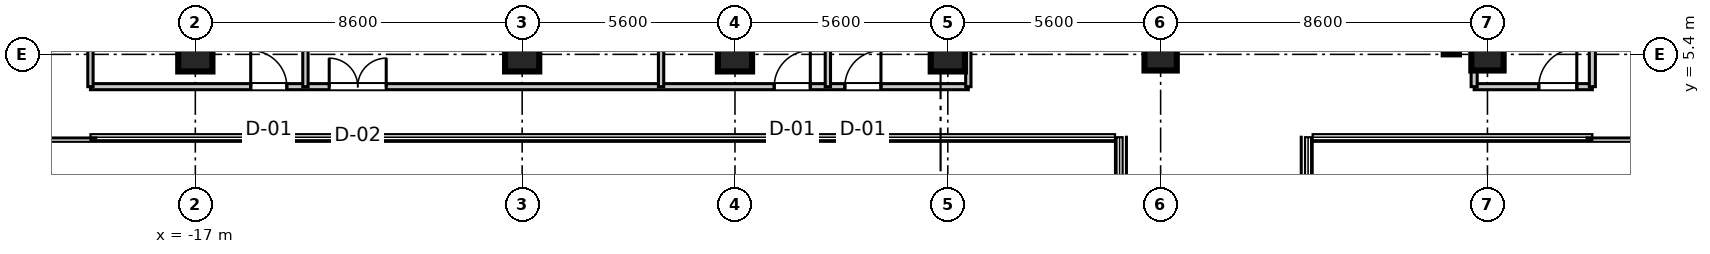
"""IFC4 building model, lengths in metres.
Left out: names, types, materials, properties, quantities, classifications, styles, units other than length and angle.
Written with IfcOpenShell. Run it as: python <this file> out.ifc"""

import sys

from ifc_helpers import new_model, si_unit, direction, frame, frame_2d, origin, origin_2d, place, context, subcontext, project, spatial, rectangle, extrude, source, transform, mapped, element, fill, save


model = new_model("IFC4")
c1 = context("Model", 3, precision=1e-05, world=origin(), true_north=direction((0.0, 1.0)))
c2 = subcontext(c1, "Body", "Model", "MODEL_VIEW")
j1 = project(units=[si_unit("LENGTHUNIT", "METRE"), si_unit("PLANEANGLEUNIT", "RADIAN")], contexts=[c1])
p1 = place(None, origin())
s1 = spatial("IfcSite", under=j1, at=p1, CompositionType="ELEMENT")
p2 = place(p1, origin())
s2 = spatial("IfcBuilding", under=s1, at=p2, CompositionType="ELEMENT")
p3 = place(p2, frame((0.0, 0.0, 304.2)))
s3 = spatial("IfcBuildingStorey", under=s2, at=p3, CompositionType="ELEMENT", Elevation=304.2)
m1 = source(origin(), c2, "Body", "SweptSolid", [
    extrude(rectangle(XDim=0.9, YDim=0.9, at=origin_2d()), origin(), (0.0, 0.0, 1.0), 3.805),
])
for number, where, z_axis, x_axis in (
    (1, (-17.0, 5.4, 0.0), (0.0, 0.0, 1.0), (1.0, 0.0, 0.0)),
    (2, (-8.4, 5.4, 0.0), (0.0, 0.0, 1.0), (1.0, 0.0, 0.0)),
    (3, (-2.8, 5.4, 0.0), (0.0, 0.0, 1.0), (1.0, 0.0, 0.0)),
    (4, (2.8, 5.4, 0.0), (0.0, 0.0, 1.0), (1.0, 0.0, 0.0)),
):
    element("IfcColumn", number, at=place(p3, frame(where, z_axis=z_axis, x_axis=x_axis)), inside=s3, PredefinedType="COLUMN", context=c2, shape_type="MappedRepresentation", body=[
        mapped(m1, transform((0.0, 0.0, 0.0), scale=1.0)),
    ])
m2 = source(origin(), c2, "Body", "SweptSolid", [
    extrude(rectangle(XDim=0.85, YDim=0.85, at=origin_2d()), origin(), (0.0, 0.0, 1.0), 3.805),
])
for number, where, z_axis, x_axis in (
    (5, (8.4, 5.4, 0.0), (0.0, 0.0, 1.0), (1.0, 0.0, 0.0)),
    (6, (17.0, 5.4, 0.0), (0.0, 0.0, 1.0), (1.0, 0.0, 0.0)),
):
    element("IfcColumn", number, at=place(p3, frame(where, z_axis=z_axis, x_axis=x_axis)), inside=s3, PredefinedType="PILASTER", context=c2, shape_type="MappedRepresentation", body=[
        mapped(m2, transform((0.0, 0.0, 0.0), scale=1.0)),
    ])
m3 = source(origin(), c2, "Body", "SweptSolid", [
    extrude(rectangle(XDim=11.6, YDim=0.4, at=frame_2d((5.8, 0.0))), origin(), (0.0, 0.0, 1.0), 3.55),
])
p4 = place(p3, frame((16.05, 5.4, 0.0), z_axis=(0.0, 0.0, 1.0), x_axis=(0.0, 1.0, 0.0)))
e7 = element("IfcWall", 7, at=p4, inside=s3, PredefinedType="SHEAR", context=c2, shape_type="MappedRepresentation", body=[
    mapped(m3, transform((0.0, 0.0, 0.0), scale=1.0)),
])
m4 = source(origin(), c2, "Body", "SweptSolid", [
    extrude(rectangle(XDim=3.11, YDim=0.16, at=frame_2d((1.555, 0.0))), origin(), (0.0, 0.0, 1.0), 2.89),
])
p5 = place(p3, frame((16.65, 4.55, 0.0), z_axis=(0.0, 0.0, 1.0), x_axis=(1.0, 0.0, 0.0)))
e8 = element("IfcWall", 8, at=p5, inside=s3, PredefinedType="PARTITIONING", context=c2, shape_type="MappedRepresentation", body=[
    mapped(m4, transform((0.0, 0.0, 0.0), scale=1.0)),
])
p6 = place(p5, frame((1.701, 0.0, 0.0)))
e9 = element("IfcOpeningElement", 9, at=p6, cuts=e8, PredefinedType="OPENING", context=c2, shape_type="SweptSolid", body=[
    extrude(rectangle(XDim=1.0, YDim=2.1, at=frame_2d((0.5, 1.05))), frame((0.0, 0.09, 0.0), z_axis=(0.0, -1.0, 0.0), x_axis=(1.0, 0.0, 0.0)), (0.0, 0.0, 1.0), 0.18),
])
m5 = source(origin(), c2, "Body", "SweptSolid", [
    extrude(rectangle(XDim=17.95, YDim=0.16, at=frame_2d((8.975, 0.0))), origin(), (0.0, 0.0, 1.0), 2.89),
])
p7 = place(p3, frame((16.65, 4.55, 0.0), z_axis=(0.0, 0.0, 1.0), x_axis=(0.0, 1.0, 0.0)))
e10 = element("IfcWall", 10, at=p7, inside=s3, PredefinedType="PARTITIONING", context=c2, shape_type="MappedRepresentation", body=[
    mapped(m5, transform((0.0, 0.0, 0.0), scale=1.0)),
])
m6 = source(origin(), c2, "Body", "SweptSolid", [
    extrude(rectangle(XDim=16.53, YDim=0.16, at=frame_2d((8.265, 0.0))), origin(), (0.0, 0.0, 1.0), 2.89),
])
p8 = place(p3, frame((19.76, 4.55, 0.0), z_axis=(0.0, 0.0, 1.0), x_axis=(0.0, 1.0, 0.0)))
e11 = element("IfcWall", 11, at=p8, inside=s3, PredefinedType="PARTITIONING", context=c2, shape_type="MappedRepresentation", body=[
    mapped(m6, transform((0.0, 0.0, 0.0), scale=1.0)),
])
m7 = source(origin(), c2, "Body", "SweptSolid", [
    extrude(rectangle(XDim=23.1, YDim=0.16, at=frame_2d((11.55, 0.0))), origin(), (0.0, 0.0, 1.0), 2.89),
])
p9 = place(p3, frame((-19.76, 4.55, 0.0), z_axis=(0.0, 0.0, 1.0), x_axis=(1.0, 0.0, 0.0)))
e12 = element("IfcWall", 12, at=p9, inside=s3, PredefinedType="PARTITIONING", context=c2, shape_type="MappedRepresentation", body=[
    mapped(m7, transform((0.0, 0.0, 0.0), scale=1.0)),
])
p10 = place(p9, frame((4.217, 0.0, 0.0)))
e13 = element("IfcOpeningElement", 13, at=p10, cuts=e12, PredefinedType="OPENING", context=c2, shape_type="SweptSolid", body=[
    extrude(rectangle(XDim=0.95, YDim=2.1, at=frame_2d((0.475, 1.05))), frame((0.0, 0.09, 0.0), z_axis=(0.0, -1.0, 0.0), x_axis=(1.0, 0.0, 0.0)), (0.0, 0.0, 1.0), 0.18),
])
p11 = place(p9, frame((6.283, 0.0, 0.0)))
e14 = element("IfcOpeningElement", 14, at=p11, cuts=e12, PredefinedType="OPENING", context=c2, shape_type="SweptSolid", body=[
    extrude(rectangle(XDim=1.5, YDim=2.15, at=frame_2d((0.75, 1.075))), frame((0.0, 0.09, 0.0), z_axis=(0.0, -1.0, 0.0), x_axis=(1.0, 0.0, 0.0)), (0.0, 0.0, 1.0), 0.18),
])
p12 = place(p9, frame((17.992, 0.0, 0.0)))
e15 = element("IfcOpeningElement", 15, at=p12, cuts=e12, PredefinedType="OPENING", context=c2, shape_type="SweptSolid", body=[
    extrude(rectangle(XDim=0.95, YDim=2.1, at=frame_2d((0.475, 1.05))), frame((0.0, 0.09, 0.0), z_axis=(0.0, -1.0, 0.0), x_axis=(1.0, 0.0, 0.0)), (0.0, 0.0, 1.0), 0.18),
])
p13 = place(p9, frame((19.851, 0.0, 0.0)))
e16 = element("IfcOpeningElement", 16, at=p13, cuts=e12, PredefinedType="OPENING", context=c2, shape_type="SweptSolid", body=[
    extrude(rectangle(XDim=0.95, YDim=2.1, at=frame_2d((0.475, 1.05))), frame((0.0, 0.09, 0.0), z_axis=(0.0, -1.0, 0.0), x_axis=(1.0, 0.0, 0.0)), (0.0, 0.0, 1.0), 0.18),
])
m8 = source(origin(), c2, "Body", "SweptSolid", [
    extrude(rectangle(XDim=16.53, YDim=0.14, at=frame_2d((8.265, 0.0))), origin(), (0.0, 0.0, 1.0), 2.89),
])
p14 = place(p3, frame((-19.76, 4.55, 0.0), z_axis=(0.0, 0.0, 1.0), x_axis=(0.0, 1.0, 0.0)))
e17 = element("IfcWall", 17, at=p14, inside=s3, PredefinedType="PARTITIONING", context=c2, shape_type="MappedRepresentation", body=[
    mapped(m8, transform((0.0, 0.0, 0.0), scale=1.0)),
])
m9 = source(origin(), c2, "Body", "SweptSolid", [
    extrude(rectangle(XDim=17.95, YDim=0.14, at=frame_2d((8.975, 0.0))), origin(), (0.0, 0.0, 1.0), 2.89),
])
for number, where, z_axis, x_axis in (
    (18, (3.34, 4.55, 0.0), (0.0, 0.0, 1.0), (0.0, 1.0, 0.0)),
    (19, (-14.103, 4.55, 0.0), (0.0, 0.0, 1.0), (0.0, 1.0, 0.0)),
    (20, (-4.745, 4.55, 0.0), (0.0, 0.0, 1.0), (0.0, 1.0, 0.0)),
    (21, (-0.356, 4.55, 0.0), (0.0, 0.0, 1.0), (0.0, 1.0, 0.0)),
):
    element("IfcWall", number, at=place(p3, frame(where, z_axis=z_axis, x_axis=x_axis)), inside=s3, PredefinedType="PARTITIONING", context=c2, shape_type="MappedRepresentation", body=[
        mapped(m9, transform((0.0, 0.0, 0.0), scale=1.0)),
    ])
m10 = source(origin(), c2, "Body", "SweptSolid", [
    extrude(rectangle(XDim=1.0, YDim=2.1, at=frame_2d((0.5, 1.05))), frame((0.0, 0.025, 0.0), z_axis=(0.0, -1.0, 0.0), x_axis=(1.0, 0.0, 0.0)), (0.0, 0.0, 1.0), 0.05),
])
p15 = place(p6, origin())
e22 = element("IfcDoor", 22, at=p15, inside=s3, OperationType="SINGLE_SWING_RIGHT", PredefinedType="DOOR", context=c2, shape_type="MappedRepresentation", body=[
    mapped(m10, transform((0.0, 0.0, 0.0), scale=1.0)),
])
fill(e9, e22)
m11 = source(origin(), c2, "Body", "SweptSolid", [
    extrude(rectangle(XDim=0.95, YDim=2.1, at=frame_2d((0.475, 1.05))), frame((0.0, 0.025, 0.0), z_axis=(0.0, -1.0, 0.0), x_axis=(1.0, 0.0, 0.0)), (0.0, 0.0, 1.0), 0.05),
])
p16 = place(p10, origin())
e23 = element("IfcDoor", 23, at=p16, inside=s3, OperationType="SINGLE_SWING_LEFT", PredefinedType="DOOR", context=c2, shape_type="MappedRepresentation", body=[
    mapped(m11, transform((0.0, 0.0, 0.0), scale=1.0)),
])
fill(e13, e23)
m12 = source(origin(), c2, "Body", "SweptSolid", [
    extrude(rectangle(XDim=1.5, YDim=2.15, at=frame_2d((0.75, 1.075))), frame((0.0, 0.025, 0.0), z_axis=(0.0, -1.0, 0.0), x_axis=(1.0, 0.0, 0.0)), (0.0, 0.0, 1.0), 0.05),
])
p17 = place(p11, origin())
e24 = element("IfcDoor", 24, at=p17, inside=s3, OperationType="DOUBLE_DOOR_SINGLE_SWING", PredefinedType="DOOR", context=c2, shape_type="MappedRepresentation", body=[
    mapped(m12, transform((0.0, 0.0, 0.0), scale=1.0)),
])
fill(e14, e24)
p18 = place(p12, origin())
e25 = element("IfcDoor", 25, at=p18, inside=s3, OperationType="SINGLE_SWING_RIGHT", PredefinedType="DOOR", context=c2, shape_type="MappedRepresentation", body=[
    mapped(m11, transform((0.0, 0.0, 0.0), scale=1.0)),
])
fill(e15, e25)
p19 = place(p13, origin())
e26 = element("IfcDoor", 26, at=p19, inside=s3, OperationType="SINGLE_SWING_RIGHT", PredefinedType="DOOR", context=c2, shape_type="MappedRepresentation", body=[
    mapped(m11, transform((0.0, 0.0, 0.0), scale=1.0)),
])
fill(e16, e26)
save(model, sys.argv[1])
